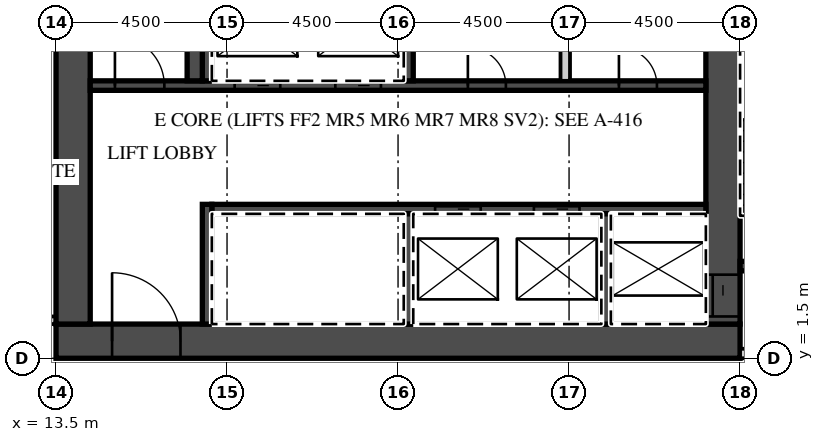
"""IFC4 building model, lengths in metres.
Left out: names, types, materials, properties, quantities, classifications, styles, units other than length and angle.
Written with IfcOpenShell. Run it as: python <this file> out.ifc"""

import sys

from ifc_helpers import new_model, si_unit, direction, frame, frame_2d, origin, place, context, subcontext, project, spatial, rectangle, extrude, element, fill, save


model = new_model("IFC4")
c1 = context("Model", 3, precision=1e-05, world=origin(), true_north=direction((0.0, 1.0)))
c2 = subcontext(c1, "Body", "Model", "MODEL_VIEW")
j1 = project(units=[si_unit("LENGTHUNIT", "METRE"), si_unit("PLANEANGLEUNIT", "RADIAN")], contexts=[c1])
p1 = place(None, origin())
s1 = spatial("IfcSite", under=j1, at=p1, CompositionType="ELEMENT")
p2 = place(p1, origin())
s2 = spatial("IfcBuilding", under=s1, at=p2, CompositionType="ELEMENT")
p3 = place(p2, frame((0.0, 0.0, 244.1)))
s3 = spatial("IfcBuildingStorey", under=s2, at=p3, CompositionType="ELEMENT", Elevation=244.1)
p4 = place(p3, frame((-13.5, 2.5, 0.0), z_axis=(0.0, 0.0, 1.0), x_axis=(1.0, 0.0, 0.0)))
e1 = element("IfcWall", 1, at=p4, inside=s3, PredefinedType="PARTITIONING", context=c2, shape_type="SweptSolid", body=[
    extrude(rectangle(XDim=27.0, YDim=0.2, at=frame_2d((13.5, 0.0))), origin(), (0.0, 0.0, 1.0), 3.02),
])
p5 = place(p4, frame((0.575, 0.0, 0.0)))
e2 = element("IfcOpeningElement", 2, at=p5, cuts=e1, PredefinedType="OPENING", context=c2, shape_type="SweptSolid", body=[
    extrude(rectangle(XDim=1.0, YDim=2.1, at=frame_2d((0.5, 1.05))), frame((0.0, 0.11, 0.0), z_axis=(0.0, -1.0, 0.0), x_axis=(1.0, 0.0, 0.0)), (0.0, 0.0, 1.0), 0.22),
])
p6 = place(p4, frame((6.938, 0.0, 0.0)))
e3 = element("IfcOpeningElement", 3, at=p6, cuts=e1, PredefinedType="OPENING", context=c2, shape_type="SweptSolid", body=[
    extrude(rectangle(XDim=1.2, YDim=2.1, at=frame_2d((0.6, 1.05))), frame((0.0, 0.11, 0.0), z_axis=(0.0, -1.0, 0.0), x_axis=(1.0, 0.0, 0.0)), (0.0, 0.0, 1.0), 0.22),
])
p7 = place(p4, frame((15.938, 0.0, 0.0)))
e4 = element("IfcOpeningElement", 4, at=p7, cuts=e1, PredefinedType="OPENING", context=c2, shape_type="SweptSolid", body=[
    extrude(rectangle(XDim=1.2, YDim=2.1, at=frame_2d((0.6, 1.05))), frame((0.0, 0.11, 0.0), z_axis=(0.0, -1.0, 0.0), x_axis=(1.0, 0.0, 0.0)), (0.0, 0.0, 1.0), 0.22),
])
p8 = place(p4, frame((23.075, 0.0, 0.0)))
e5 = element("IfcOpeningElement", 5, at=p8, cuts=e1, PredefinedType="OPENING", context=c2, shape_type="SweptSolid", body=[
    extrude(rectangle(XDim=1.0, YDim=2.1, at=frame_2d((0.5, 1.05))), frame((0.0, 0.11, 0.0), z_axis=(0.0, -1.0, 0.0), x_axis=(1.0, 0.0, 0.0)), (0.0, 0.0, 1.0), 0.22),
])
p9 = place(p3, frame((13.5, 1.95, 0.0), z_axis=(0.0, 0.0, 1.0), x_axis=(1.0, 0.0, 0.0)))
e6 = element("IfcWall", 6, at=p9, inside=s3, PredefinedType="SHEAR", context=c2, shape_type="SweptSolid", body=[
    extrude(rectangle(XDim=18.0, YDim=0.9, at=frame_2d((9.0, 0.0))), origin(), (0.0, 0.0, 1.0), 3.02),
])
p10 = place(p9, frame((1.475, 0.0, 0.0)))
e7 = element("IfcOpeningElement", 7, at=p10, cuts=e6, PredefinedType="OPENING", context=c2, shape_type="SweptSolid", body=[
    extrude(rectangle(XDim=1.8, YDim=2.1, at=frame_2d((0.9, 1.05))), frame((0.0, 0.46, 0.0), z_axis=(0.0, -1.0, 0.0), x_axis=(1.0, 0.0, 0.0)), (0.0, 0.0, 1.0), 0.92),
])
p11 = place(p3, frame((31.05, 2.4, 0.0), z_axis=(0.0, 0.0, 1.0), x_axis=(0.0, 1.0, 0.0)))
e8 = element("IfcWall", 8, at=p11, inside=s3, PredefinedType="SHEAR", context=c2, shape_type="SweptSolid", body=[
    extrude(rectangle(XDim=12.8, YDim=0.9, at=frame_2d((6.4, 0.0))), origin(), (0.0, 0.0, 1.0), 3.02),
])
p12 = place(p11, frame((0.2, 0.0, 0.0)))
e9 = element("IfcOpeningElement", 9, at=p12, cuts=e8, PredefinedType="OPENING", context=c2, shape_type="SweptSolid", body=[
    extrude(rectangle(XDim=1.1, YDim=2.1, at=frame_2d((0.55, 1.05))), frame((0.0, 0.46, 0.0), z_axis=(0.0, -1.0, 0.0), x_axis=(1.0, 0.0, 0.0)), (0.0, 0.0, 1.0), 0.92),
])
p13 = place(p3, frame((13.95, 2.4, 0.0), z_axis=(0.0, 0.0, 1.0), x_axis=(0.0, 1.0, 0.0)))
e10 = element("IfcWall", 10, at=p13, inside=s3, PredefinedType="SHEAR", context=c2, shape_type="SweptSolid", body=[
    extrude(rectangle(XDim=12.2, YDim=0.9, at=frame_2d((6.1, 0.0))), origin(), (0.0, 0.0, 1.0), 3.02),
])
p14 = place(p3, frame((17.6, 5.425, 0.0), z_axis=(0.0, 0.0, 1.0), x_axis=(1.0, 0.0, 0.0)))
e11 = element("IfcWall", 11, at=p14, inside=s3, PredefinedType="SHEAR", context=c2, shape_type="SweptSolid", body=[
    extrude(rectangle(XDim=13.0, YDim=0.25, at=frame_2d((6.5, 0.0))), origin(), (0.0, 0.0, 1.0), 3.02),
])
p15 = place(p14, frame((8.475, 0.0, 0.0)))
e12 = element("IfcOpeningElement", 12, at=p15, cuts=e11, PredefinedType="OPENING", context=c2, shape_type="SweptSolid", body=[
    extrude(rectangle(XDim=1.2, YDim=2.1, at=frame_2d((0.6, 1.05))), frame((0.0, 0.135, 0.0), z_axis=(0.0, -1.0, 0.0), x_axis=(1.0, 0.0, 0.0)), (0.0, 0.0, 1.0), 0.27),
])
p16 = place(p14, frame((5.875, 0.0, 0.0)))
e13 = element("IfcOpeningElement", 13, at=p16, cuts=e11, PredefinedType="OPENING", context=c2, shape_type="SweptSolid", body=[
    extrude(rectangle(XDim=1.2, YDim=2.1, at=frame_2d((0.6, 1.05))), frame((0.0, 0.135, 0.0), z_axis=(0.0, -1.0, 0.0), x_axis=(1.0, 0.0, 0.0)), (0.0, 0.0, 1.0), 0.27),
])
p17 = place(p3, frame((17.475, 2.4, 0.0), z_axis=(0.0, 0.0, 1.0), x_axis=(0.0, 1.0, 0.0)))
e14 = element("IfcWall", 14, at=p17, inside=s3, PredefinedType="SHEAR", context=c2, shape_type="SweptSolid", body=[
    extrude(rectangle(XDim=3.15, YDim=0.25, at=frame_2d((1.575, 0.0))), origin(), (0.0, 0.0, 1.0), 3.02),
])
for number, where, z_axis, x_axis in (
    (15, (27.975, 2.4, 0.0), (0.0, 0.0, 1.0), (0.0, 1.0, 0.0)),
    (16, (22.775, 2.4, 0.0), (0.0, 0.0, 1.0), (0.0, 1.0, 0.0)),
):
    element("IfcWall", number, at=place(p3, frame(where, z_axis=z_axis, x_axis=x_axis)), inside=s3, PredefinedType="SHEAR", context=c2, shape_type="SweptSolid", body=[
        extrude(rectangle(XDim=2.9, YDim=0.25, at=frame_2d((1.45, 0.0))), origin(), (0.0, 0.0, 1.0), 3.02),
    ])
p18 = place(p3, frame((14.4, 8.675, 0.0), z_axis=(0.0, 0.0, 1.0), x_axis=(1.0, 0.0, 0.0)))
e17 = element("IfcWall", 17, at=p18, inside=s3, PredefinedType="SHEAR", context=c2, shape_type="SweptSolid", body=[
    extrude(rectangle(XDim=16.2, YDim=0.25, at=frame_2d((8.1, 0.0))), origin(), (0.0, 0.0, 1.0), 3.02),
])
p19 = place(p18, frame((6.45, 0.0, 0.0)))
e18 = element("IfcOpeningElement", 18, at=p19, cuts=e17, PredefinedType="OPENING", context=c2, shape_type="SweptSolid", body=[
    extrude(rectangle(XDim=1.2, YDim=2.1, at=frame_2d((0.6, 1.05))), frame((0.0, 0.135, 0.0), z_axis=(0.0, -1.0, 0.0), x_axis=(1.0, 0.0, 0.0)), (0.0, 0.0, 1.0), 0.27),
])
p20 = place(p18, frame((3.8, 0.0, 0.0)))
e19 = element("IfcOpeningElement", 19, at=p20, cuts=e17, PredefinedType="OPENING", context=c2, shape_type="SweptSolid", body=[
    extrude(rectangle(XDim=1.2, YDim=2.1, at=frame_2d((0.6, 1.05))), frame((0.0, 0.135, 0.0), z_axis=(0.0, -1.0, 0.0), x_axis=(1.0, 0.0, 0.0)), (0.0, 0.0, 1.0), 0.27),
])
p21 = place(p18, frame((0.65, 0.0, 0.0)))
e20 = element("IfcOpeningElement", 20, at=p21, cuts=e17, PredefinedType="OPENING", context=c2, shape_type="SweptSolid", body=[
    extrude(rectangle(XDim=1.3, YDim=2.1, at=frame_2d((0.65, 1.05))), frame((0.0, 0.135, 0.0), z_axis=(0.0, -1.0, 0.0), x_axis=(1.0, 0.0, 0.0)), (0.0, 0.0, 1.0), 0.27),
])
p22 = place(p18, frame((13.913, 0.0, 0.0)))
e21 = element("IfcOpeningElement", 21, at=p22, cuts=e17, PredefinedType="OPENING", context=c2, shape_type="SweptSolid", body=[
    extrude(rectangle(XDim=1.0, YDim=2.1, at=frame_2d((0.5, 1.05))), frame((0.0, 0.135, 0.0), z_axis=(0.0, -1.0, 0.0), x_axis=(1.0, 0.0, 0.0)), (0.0, 0.0, 1.0), 0.27),
])
p23 = place(p18, frame((9.938, 0.0, 0.0)))
e22 = element("IfcOpeningElement", 22, at=p23, cuts=e17, PredefinedType="OPENING", context=c2, shape_type="SweptSolid", body=[
    extrude(rectangle(XDim=1.0, YDim=2.1, at=frame_2d((0.5, 1.05))), frame((0.0, 0.135, 0.0), z_axis=(0.0, -1.0, 0.0), x_axis=(1.0, 0.0, 0.0)), (0.0, 0.0, 1.0), 0.27),
])
for number, where, z_axis, x_axis in (
    (23, (17.475, 8.8, 0.0), (0.0, 0.0, 1.0), (0.0, 1.0, 0.0)),
    (24, (22.775, 8.8, 0.0), (0.0, 0.0, 1.0), (0.0, 1.0, 0.0)),
):
    element("IfcWall", number, at=place(p3, frame(where, z_axis=z_axis, x_axis=x_axis)), inside=s3, PredefinedType="SHEAR", context=c2, shape_type="SweptSolid", body=[
        extrude(rectangle(XDim=2.9, YDim=0.25, at=frame_2d((1.45, 0.0))), origin(), (0.0, 0.0, 1.0), 3.02),
    ])
p24 = place(p3, frame((26.9, 8.8, 0.0), z_axis=(0.0, 0.0, 1.0), x_axis=(0.0, 1.0, 0.0)))
e25 = element("IfcWall", 25, at=p24, inside=s3, PredefinedType="PARTITIONING", context=c2, shape_type="SweptSolid", body=[
    extrude(rectangle(XDim=2.9, YDim=0.25, at=frame_2d((1.45, 0.0))), origin(), (0.0, 0.0, 1.0), 3.02),
])
p25 = place(p3, frame((17.15, 8.8, 0.0), z_axis=(0.0, 0.0, 1.0), x_axis=(0.0, 1.0, 0.0)))
e26 = element("IfcWall", 26, at=p25, inside=s3, PredefinedType="SHEAR", context=c2, shape_type="SweptSolid", body=[
    extrude(rectangle(XDim=5.8, YDim=0.4, at=frame_2d((2.9, 0.0))), origin(), (0.0, 0.0, 1.0), 3.02),
])
p26 = place(p3, frame((31.5, 1.625, 0.0), z_axis=(0.0, 0.0, 1.0), x_axis=(1.0, 0.0, 0.0)))
e27 = element("IfcWall", 27, at=p26, inside=s3, PredefinedType="PARTITIONING", context=c2, shape_type="SweptSolid", body=[
    extrude(rectangle(XDim=11.04, YDim=0.25, at=frame_2d((5.52, 0.0))), origin(), (0.0, 0.0, 1.0), 3.02),
])
p27 = place(p26, frame((0.625, 0.0, 0.0)))
e28 = element("IfcOpeningElement", 28, at=p27, cuts=e27, PredefinedType="OPENING", context=c2, shape_type="SweptSolid", body=[
    extrude(rectangle(XDim=1.3, YDim=2.1, at=frame_2d((0.65, 1.05))), frame((0.0, 0.135, 0.0), z_axis=(0.0, -1.0, 0.0), x_axis=(1.0, 0.0, 0.0)), (0.0, 0.0, 1.0), 0.27),
])
p28 = place(p26, frame((3.25, 0.0, 0.0)))
e29 = element("IfcOpeningElement", 29, at=p28, cuts=e27, PredefinedType="OPENING", context=c2, shape_type="SweptSolid", body=[
    extrude(rectangle(XDim=1.1, YDim=2.1, at=frame_2d((0.55, 1.05))), frame((0.0, 0.135, 0.0), z_axis=(0.0, -1.0, 0.0), x_axis=(1.0, 0.0, 0.0)), (0.0, 0.0, 1.0), 0.27),
])
p29 = place(p3, frame((31.5, 3.925, 0.0), z_axis=(0.0, 0.0, 1.0), x_axis=(1.0, 0.0, 0.0)))
e30 = element("IfcWall", 30, at=p29, inside=s3, PredefinedType="SHEAR", context=c2, shape_type="SweptSolid", body=[
    extrude(rectangle(XDim=2.55, YDim=0.25, at=frame_2d((1.275, 0.0))), origin(), (0.0, 0.0, 1.0), 3.02),
])
p30 = place(p29, frame((0.625, 0.0, 0.0)))
e31 = element("IfcOpeningElement", 31, at=p30, cuts=e30, PredefinedType="OPENING", context=c2, shape_type="SweptSolid", body=[
    extrude(rectangle(XDim=1.3, YDim=2.1, at=frame_2d((0.65, 1.05))), frame((0.0, 0.135, 0.0), z_axis=(0.0, -1.0, 0.0), x_axis=(1.0, 0.0, 0.0)), (0.0, 0.0, 1.0), 0.27),
])
p31 = place(p19, origin())
e32 = element("IfcDoor", 32, at=p31, inside=s3, OperationType="SLIDING_TO_LEFT", PredefinedType="DOOR", context=c2, shape_type="SweptSolid", body=[
    extrude(rectangle(XDim=1.2, YDim=2.1, at=frame_2d((0.6, 1.05))), frame((0.0, 0.025, 0.0), z_axis=(0.0, -1.0, 0.0), x_axis=(1.0, 0.0, 0.0)), (0.0, 0.0, 1.0), 0.05),
])
fill(e18, e32)
p32 = place(p20, origin())
e33 = element("IfcDoor", 33, at=p32, inside=s3, OperationType="SLIDING_TO_RIGHT", PredefinedType="DOOR", context=c2, shape_type="SweptSolid", body=[
    extrude(rectangle(XDim=1.2, YDim=2.1, at=frame_2d((0.6, 1.05))), frame((0.0, 0.025, 0.0), z_axis=(0.0, -1.0, 0.0), x_axis=(1.0, 0.0, 0.0)), (0.0, 0.0, 1.0), 0.05),
])
fill(e19, e33)
p33 = place(p15, origin())
e34 = element("IfcDoor", 34, at=p33, inside=s3, OperationType="SLIDING_TO_LEFT", PredefinedType="DOOR", context=c2, shape_type="SweptSolid", body=[
    extrude(rectangle(XDim=1.2, YDim=2.1, at=frame_2d((0.6, 1.05))), frame((0.0, 0.025, 0.0), z_axis=(0.0, -1.0, 0.0), x_axis=(1.0, 0.0, 0.0)), (0.0, 0.0, 1.0), 0.05),
])
fill(e12, e34)
p34 = place(p16, origin())
e35 = element("IfcDoor", 35, at=p34, inside=s3, OperationType="SLIDING_TO_RIGHT", PredefinedType="DOOR", context=c2, shape_type="SweptSolid", body=[
    extrude(rectangle(XDim=1.2, YDim=2.1, at=frame_2d((0.6, 1.05))), frame((0.0, 0.025, 0.0), z_axis=(0.0, -1.0, 0.0), x_axis=(1.0, 0.0, 0.0)), (0.0, 0.0, 1.0), 0.05),
])
fill(e13, e35)
p35 = place(p12, origin())
e36 = element("IfcDoor", 36, at=p35, inside=s3, OperationType="SLIDING_TO_LEFT", PredefinedType="DOOR", context=c2, shape_type="SweptSolid", body=[
    extrude(rectangle(XDim=1.1, YDim=2.1, at=frame_2d((0.55, 1.05))), frame((0.0, 0.025, 0.0), z_axis=(0.0, -1.0, 0.0), x_axis=(1.0, 0.0, 0.0)), (0.0, 0.0, 1.0), 0.05),
])
fill(e9, e36)
p36 = place(p10, origin())
e37 = element("IfcDoor", 37, at=p36, inside=s3, OperationType="DOUBLE_DOOR_DOUBLE_SWING", PredefinedType="DOOR", context=c2, shape_type="SweptSolid", body=[
    extrude(rectangle(XDim=1.8, YDim=2.1, at=frame_2d((0.9, 1.05))), frame((0.0, 0.025, 0.0), z_axis=(0.0, -1.0, 0.0), x_axis=(1.0, 0.0, 0.0)), (0.0, 0.0, 1.0), 0.05),
])
fill(e7, e37)
p37 = place(p21, origin())
e38 = element("IfcDoor", 38, at=p37, inside=s3, OperationType="SINGLE_SWING_LEFT", PredefinedType="DOOR", context=c2, shape_type="SweptSolid", body=[
    extrude(rectangle(XDim=1.3, YDim=2.1, at=frame_2d((0.65, 1.05))), frame((0.0, 0.025, 0.0), z_axis=(0.0, -1.0, 0.0), x_axis=(1.0, 0.0, 0.0)), (0.0, 0.0, 1.0), 0.05),
])
fill(e20, e38)
p38 = place(p22, origin())
e39 = element("IfcDoor", 39, at=p38, inside=s3, OperationType="SINGLE_SWING_LEFT", PredefinedType="DOOR", context=c2, shape_type="SweptSolid", body=[
    extrude(rectangle(XDim=1.0, YDim=2.1, at=frame_2d((0.5, 1.05))), frame((0.0, 0.025, 0.0), z_axis=(0.0, -1.0, 0.0), x_axis=(1.0, 0.0, 0.0)), (0.0, 0.0, 1.0), 0.05),
])
fill(e21, e39)
p39 = place(p23, origin())
e40 = element("IfcDoor", 40, at=p39, inside=s3, OperationType="SINGLE_SWING_LEFT", PredefinedType="DOOR", context=c2, shape_type="SweptSolid", body=[
    extrude(rectangle(XDim=1.0, YDim=2.1, at=frame_2d((0.5, 1.05))), frame((0.0, 0.025, 0.0), z_axis=(0.0, -1.0, 0.0), x_axis=(1.0, 0.0, 0.0)), (0.0, 0.0, 1.0), 0.05),
])
fill(e22, e40)
save(model, sys.argv[1])
